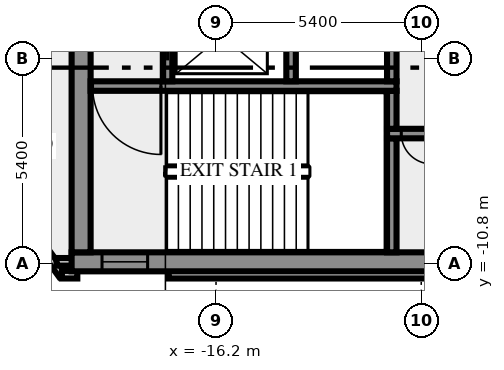
"""IFC4 building model, lengths in metres.
Left out: names, types, materials, properties, quantities, classifications, styles, units other than length and angle.
Written with IfcOpenShell. Run it as: python <this file> out.ifc"""

import sys

from ifc_helpers import new_model, si_unit, direction, frame, frame_2d, origin, place, context, subcontext, project, spatial, rectangle, extrude, element, fill, save


model = new_model("IFC4")
c1 = context("Model", 3, precision=1e-05, world=origin(), true_north=direction((0.0, 1.0)))
c2 = subcontext(c1, "Body", "Model", "MODEL_VIEW")
j1 = project(units=[si_unit("LENGTHUNIT", "METRE"), si_unit("PLANEANGLEUNIT", "RADIAN")], contexts=[c1])
p1 = place(None, origin())
s1 = spatial("IfcSite", under=j1, at=p1, CompositionType="ELEMENT")
p2 = place(p1, origin())
s2 = spatial("IfcBuilding", under=s1, at=p2, CompositionType="ELEMENT")
p3 = place(p2, frame((0.0, 0.0, 265.0)))
s3 = spatial("IfcBuildingStorey", under=s2, at=p3, CompositionType="ELEMENT", Elevation=265.0)
p4 = place(p3, frame((-21.833, -8.909, 0.0), z_axis=(0.0, 0.0, 1.0), x_axis=(0.587766567315, -0.809030569476, 0.0)))
e1 = element("IfcWall", 1, at=p4, inside=s3, PredefinedType="SOLIDWALL", context=c2, shape_type="SweptSolid", body=[
    extrude(rectangle(XDim=2.688, YDim=0.2, at=frame_2d((1.344, 0.0))), origin(), (0.0, 0.0, 1.0), 3.65),
])
p5 = place(p3, frame((-20.256, -11.088, 0.0), z_axis=(0.0, 0.0, 1.0), x_axis=(1.0, 0.0, 0.0)))
e2 = element("IfcWall", 2, at=p5, inside=s3, PredefinedType="SOLIDWALL", context=c2, shape_type="SweptSolid", body=[
    extrude(rectangle(XDim=0.406, YDim=0.2, at=frame_2d((0.203, 0.0))), origin(), (0.0, 0.0, 1.0), 3.65),
])
p6 = place(p3, frame((-17.444, -11.088, 0.0), z_axis=(0.0, 0.0, 1.0), x_axis=(1.0, 0.0, 0.0)))
e3 = element("IfcWall", 3, at=p6, inside=s3, PredefinedType="SOLIDWALL", context=c2, shape_type="SweptSolid", body=[
    extrude(rectangle(XDim=34.888, YDim=0.2, at=frame_2d((17.444, 0.0))), origin(), (0.0, 0.0, 1.0), 3.65),
])
p7 = place(p3, frame((-19.98, -10.75, 0.0), z_axis=(0.0, 0.0, 1.0), x_axis=(-1.0, 0.0, 0.0)))
e4 = element("IfcWall", 4, at=p7, inside=s3, PredefinedType="SOLIDWALL", context=c2, shape_type="SweptSolid", body=[
    extrude(rectangle(XDim=0.417, YDim=0.2, at=frame_2d((0.208, 0.0))), origin(), (0.0, 0.0, 1.0), 3.65),
])
p8 = place(p3, frame((-20.0, -10.75, 0.0), z_axis=(0.0, 0.0, 1.0), x_axis=(1.0, 0.0, 0.0)))
e5 = element("IfcWall", 5, at=p8, inside=s3, PredefinedType="SHEAR", context=c2, shape_type="SweptSolid", body=[
    extrude(rectangle(XDim=40.0, YDim=0.5, at=frame_2d((20.0, 0.0))), origin(), (0.0, 0.0, 1.0), 3.65),
])
p9 = place(p8, frame((0.8, 0.0, 1.0)))
e6 = element("IfcOpeningElement", 6, at=p9, cuts=e5, PredefinedType="OPENING", context=c2, shape_type="SweptSolid", body=[
    extrude(rectangle(XDim=1.2, YDim=1.2, at=frame_2d((0.6, 0.6))), frame((0.0, 0.26, 0.0), z_axis=(0.0, -1.0, 0.0), x_axis=(1.0, 0.0, 0.0)), (0.0, 0.0, 1.0), 0.52),
])
p10 = place(p8, frame((38.0, 0.0, 1.0)))
e7 = element("IfcOpeningElement", 7, at=p10, cuts=e5, PredefinedType="OPENING", context=c2, shape_type="SweptSolid", body=[
    extrude(rectangle(XDim=1.2, YDim=1.2, at=frame_2d((0.6, 0.6))), frame((0.0, 0.26, 0.0), z_axis=(0.0, -1.0, 0.0), x_axis=(1.0, 0.0, 0.0)), (0.0, 0.0, 1.0), 0.52),
])
p11 = place(p3, frame((-19.75, -10.5, 0.0), z_axis=(0.0, 0.0, 1.0), x_axis=(0.0, 1.0, 0.0)))
e8 = element("IfcWall", 8, at=p11, inside=s3, PredefinedType="SHEAR", context=c2, shape_type="SweptSolid", body=[
    extrude(rectangle(XDim=8.8, YDim=0.5, at=frame_2d((4.4, 0.0))), origin(), (0.0, 0.0, 1.0), 3.65),
])
p12 = place(p3, frame((-11.575, -10.5, 0.0), z_axis=(0.0, 0.0, 1.0), x_axis=(0.0, 1.0, 0.0)))
e9 = element("IfcWall", 9, at=p12, inside=s3, PredefinedType="SHEAR", context=c2, shape_type="SweptSolid", body=[
    extrude(rectangle(XDim=3.0, YDim=0.25, at=frame_2d((1.5, 0.0))), origin(), (0.0, 0.0, 1.0), 3.65),
])
p13 = place(p3, frame((11.7, -7.375, 0.0), z_axis=(0.0, 0.0, 1.0), x_axis=(-1.0, 0.0, 0.0)))
e10 = element("IfcWall", 10, at=p13, inside=s3, PredefinedType="SHEAR", context=c2, shape_type="SweptSolid", body=[
    extrude(rectangle(XDim=23.4, YDim=0.25, at=frame_2d((11.7, 0.0))), origin(), (0.0, 0.0, 1.0), 3.65),
])
p14 = place(p13, frame((22.225, 0.0, 0.0)))
e11 = element("IfcOpeningElement", 11, at=p14, cuts=e10, PredefinedType="OPENING", context=c2, shape_type="SweptSolid", body=[
    extrude(rectangle(XDim=0.8, YDim=2.1, at=frame_2d((0.4, 1.05))), frame((0.0, 0.135, 0.0), z_axis=(0.0, -1.0, 0.0), x_axis=(1.0, 0.0, 0.0)), (0.0, 0.0, 1.0), 0.27),
])
p15 = place(p13, frame((20.2, 0.0, 0.0)))
e12 = element("IfcOpeningElement", 12, at=p15, cuts=e10, PredefinedType="OPENING", context=c2, shape_type="SweptSolid", body=[
    extrude(rectangle(XDim=1.1, YDim=2.1, at=frame_2d((0.55, 1.05))), frame((0.0, 0.135, 0.0), z_axis=(0.0, -1.0, 0.0), x_axis=(1.0, 0.0, 0.0)), (0.0, 0.0, 1.0), 0.27),
])
p16 = place(p13, frame((17.7, 0.0, 0.0)))
e13 = element("IfcOpeningElement", 13, at=p16, cuts=e10, PredefinedType="OPENING", context=c2, shape_type="SweptSolid", body=[
    extrude(rectangle(XDim=1.1, YDim=2.1, at=frame_2d((0.55, 1.05))), frame((0.0, 0.135, 0.0), z_axis=(0.0, -1.0, 0.0), x_axis=(1.0, 0.0, 0.0)), (0.0, 0.0, 1.0), 0.27),
])
p17 = place(p13, frame((15.975, 0.0, 0.0)))
e14 = element("IfcOpeningElement", 14, at=p17, cuts=e10, PredefinedType="OPENING", context=c2, shape_type="SweptSolid", body=[
    extrude(rectangle(XDim=0.8, YDim=2.1, at=frame_2d((0.4, 1.05))), frame((0.0, 0.135, 0.0), z_axis=(0.0, -1.0, 0.0), x_axis=(1.0, 0.0, 0.0)), (0.0, 0.0, 1.0), 0.27),
])
p18 = place(p13, frame((14.75, 0.0, 0.0)))
e15 = element("IfcOpeningElement", 15, at=p18, cuts=e10, PredefinedType="OPENING", context=c2, shape_type="SweptSolid", body=[
    extrude(rectangle(XDim=0.7, YDim=2.1, at=frame_2d((0.35, 1.05))), frame((0.0, 0.135, 0.0), z_axis=(0.0, -1.0, 0.0), x_axis=(1.0, 0.0, 0.0)), (0.0, 0.0, 1.0), 0.27),
])
p19 = place(p13, frame((13.35, 0.0, 0.0)))
e16 = element("IfcOpeningElement", 16, at=p19, cuts=e10, PredefinedType="OPENING", context=c2, shape_type="SweptSolid", body=[
    extrude(rectangle(XDim=0.9, YDim=2.1, at=frame_2d((0.45, 1.05))), frame((0.0, 0.135, 0.0), z_axis=(0.0, -1.0, 0.0), x_axis=(1.0, 0.0, 0.0)), (0.0, 0.0, 1.0), 0.27),
])
p20 = place(p13, frame((11.975, 0.0, 0.0)))
e17 = element("IfcOpeningElement", 17, at=p20, cuts=e10, PredefinedType="OPENING", context=c2, shape_type="SweptSolid", body=[
    extrude(rectangle(XDim=0.9, YDim=2.1, at=frame_2d((0.45, 1.05))), frame((0.0, 0.135, 0.0), z_axis=(0.0, -1.0, 0.0), x_axis=(1.0, 0.0, 0.0)), (0.0, 0.0, 1.0), 0.27),
])
p21 = place(p13, frame((10.5, 0.0, 0.0)))
e18 = element("IfcOpeningElement", 18, at=p21, cuts=e10, PredefinedType="OPENING", context=c2, shape_type="SweptSolid", body=[
    extrude(rectangle(XDim=0.9, YDim=2.1, at=frame_2d((0.45, 1.05))), frame((0.0, 0.135, 0.0), z_axis=(0.0, -1.0, 0.0), x_axis=(1.0, 0.0, 0.0)), (0.0, 0.0, 1.0), 0.27),
])
p22 = place(p13, frame((8.663, 0.0, 0.0)))
e19 = element("IfcOpeningElement", 19, at=p22, cuts=e10, PredefinedType="OPENING", context=c2, shape_type="SweptSolid", body=[
    extrude(rectangle(XDim=0.9, YDim=2.1, at=frame_2d((0.45, 1.05))), frame((0.0, 0.135, 0.0), z_axis=(0.0, -1.0, 0.0), x_axis=(1.0, 0.0, 0.0)), (0.0, 0.0, 1.0), 0.27),
])
p23 = place(p13, frame((6.05, 0.0, 0.0)))
e20 = element("IfcOpeningElement", 20, at=p23, cuts=e10, PredefinedType="OPENING", context=c2, shape_type="SweptSolid", body=[
    extrude(rectangle(XDim=0.9, YDim=2.1, at=frame_2d((0.45, 1.05))), frame((0.0, 0.135, 0.0), z_axis=(0.0, -1.0, 0.0), x_axis=(1.0, 0.0, 0.0)), (0.0, 0.0, 1.0), 0.27),
])
p24 = place(p13, frame((2.088, 0.0, 0.0)))
e21 = element("IfcOpeningElement", 21, at=p24, cuts=e10, PredefinedType="OPENING", context=c2, shape_type="SweptSolid", body=[
    extrude(rectangle(XDim=0.9, YDim=2.1, at=frame_2d((0.45, 1.05))), frame((0.0, 0.135, 0.0), z_axis=(0.0, -1.0, 0.0), x_axis=(1.0, 0.0, 0.0)), (0.0, 0.0, 1.0), 0.27),
])
p25 = place(p3, frame((-11.575, -7.25, 0.0), z_axis=(0.0, 0.0, 1.0), x_axis=(0.0, 1.0, 0.0)))
e22 = element("IfcWall", 22, at=p25, inside=s3, PredefinedType="SHEAR", context=c2, shape_type="SweptSolid", body=[
    extrude(rectangle(XDim=1.0, YDim=0.25, at=frame_2d((0.5, 0.0))), origin(), (0.0, 0.0, 1.0), 3.65),
])
p26 = place(p3, frame((-11.45, -6.125, 0.0), z_axis=(0.0, 0.0, 1.0), x_axis=(-1.0, 0.0, 0.0)))
e23 = element("IfcWall", 23, at=p26, inside=s3, PredefinedType="SHEAR", context=c2, shape_type="SweptSolid", body=[
    extrude(rectangle(XDim=8.05, YDim=0.25, at=frame_2d((4.025, 0.0))), origin(), (0.0, 0.0, 1.0), 3.65),
])
p27 = place(p26, frame((6.2, 0.0, 0.0)))
e24 = element("IfcOpeningElement", 24, at=p27, cuts=e23, PredefinedType="OPENING", context=c2, shape_type="SweptSolid", body=[
    extrude(rectangle(XDim=1.8, YDim=2.1, at=frame_2d((0.9, 1.05))), frame((0.0, 0.135, 0.0), z_axis=(0.0, -1.0, 0.0), x_axis=(1.0, 0.0, 0.0)), (0.0, 0.0, 1.0), 0.27),
])
p28 = place(p3, frame((-17.475, -6.0, 0.0), z_axis=(0.0, 0.0, 1.0), x_axis=(0.0, 1.0, 0.0)))
e25 = element("IfcWall", 25, at=p28, inside=s3, PredefinedType="SHEAR", context=c2, shape_type="SweptSolid", body=[
    extrude(rectangle(XDim=4.3, YDim=0.25, at=frame_2d((2.15, 0.0))), origin(), (0.0, 0.0, 1.0), 3.65),
])
p29 = place(p28, frame((0.55, 0.0, 0.0)))
e26 = element("IfcOpeningElement", 26, at=p29, cuts=e25, PredefinedType="OPENING", context=c2, shape_type="SweptSolid", body=[
    extrude(rectangle(XDim=1.3, YDim=2.1, at=frame_2d((0.65, 1.05))), frame((0.0, 0.135, 0.0), z_axis=(0.0, -1.0, 0.0), x_axis=(1.0, 0.0, 0.0)), (0.0, 0.0, 1.0), 0.27),
])
for number, where, z_axis, x_axis in (
    (27, (-14.225, -6.0, 0.0), (0.0, 0.0, 1.0), (0.0, 1.0, 0.0)),
    (28, (-11.575, -6.0, 0.0), (0.0, 0.0, 1.0), (0.0, 1.0, 0.0)),
):
    element("IfcWall", number, at=place(p3, frame(where, z_axis=z_axis, x_axis=x_axis)), inside=s3, PredefinedType="SHEAR", context=c2, shape_type="SweptSolid", body=[
        extrude(rectangle(XDim=1.75, YDim=0.25, at=frame_2d((0.875, 0.0))), origin(), (0.0, 0.0, 1.0), 3.65),
    ])
p30 = place(p9, origin())
e29 = element("IfcWindow", 29, at=p30, inside=s3, PartitioningType="SINGLE_PANEL", PredefinedType="WINDOW", context=c2, shape_type="SweptSolid", body=[
    extrude(rectangle(XDim=1.2, YDim=1.2, at=frame_2d((0.6, 0.6))), frame((0.0, 0.03, 0.0), z_axis=(0.0, -1.0, 0.0), x_axis=(1.0, 0.0, 0.0)), (0.0, 0.0, 1.0), 0.06),
])
fill(e6, e29)
p31 = place(p14, origin())
e30 = element("IfcDoor", 30, at=p31, inside=s3, OperationType="SINGLE_SWING_RIGHT", PredefinedType="DOOR", context=c2, shape_type="SweptSolid", body=[
    extrude(rectangle(XDim=0.8, YDim=2.1, at=frame_2d((0.4, 1.05))), frame((0.0, 0.025, 0.0), z_axis=(0.0, -1.0, 0.0), x_axis=(1.0, 0.0, 0.0)), (0.0, 0.0, 1.0), 0.05),
])
fill(e11, e30)
p32 = place(p27, origin())
e31 = element("IfcDoor", 31, at=p32, inside=s3, OperationType="DOUBLE_DOOR_SINGLE_SWING", PredefinedType="DOOR", context=c2, shape_type="SweptSolid", body=[
    extrude(rectangle(XDim=1.8, YDim=2.1, at=frame_2d((0.9, 1.05))), frame((0.0, 0.025, 0.0), z_axis=(0.0, -1.0, 0.0), x_axis=(1.0, 0.0, 0.0)), (0.0, 0.0, 1.0), 0.05),
])
fill(e24, e31)
p33 = place(p29, origin())
e32 = element("IfcDoor", 32, at=p33, inside=s3, OperationType="DOUBLE_DOOR_SLIDING", PredefinedType="DOOR", context=c2, shape_type="SweptSolid", body=[
    extrude(rectangle(XDim=1.3, YDim=2.1, at=frame_2d((0.65, 1.05))), frame((0.0, 0.025, 0.0), z_axis=(0.0, -1.0, 0.0), x_axis=(1.0, 0.0, 0.0)), (0.0, 0.0, 1.0), 0.05),
])
fill(e26, e32)
save(model, sys.argv[1])
